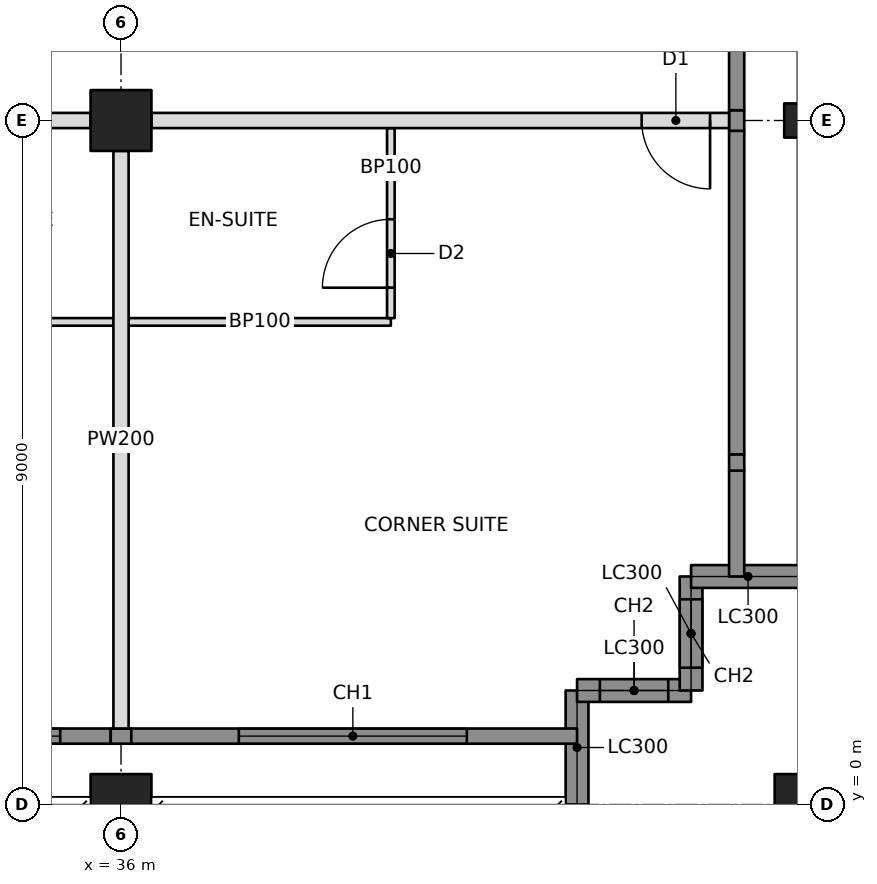
"""IFC4 building model, lengths in metres.
Left out: names, types, materials, properties, quantities, classifications, styles, units other than length and angle.
Written with IfcOpenShell. Run it as: python <this file> out.ifc"""

import sys

from ifc_helpers import new_model, si_unit, direction, frame, frame_2d, origin, origin_2d, place, context, subcontext, project, spatial, rectangle, hollow_rectangle, i_section, extrude, element, fill, save


model = new_model("IFC4")
c1 = context("Model", 3, precision=1e-05, world=origin(), true_north=direction((0.0, 1.0)))
c2 = subcontext(c1, "Body", "Model", "MODEL_VIEW")
j1 = project(units=[si_unit("LENGTHUNIT", "METRE"), si_unit("PLANEANGLEUNIT", "RADIAN")], contexts=[c1])
p1 = place(None, origin())
s1 = spatial("IfcSite", under=j1, at=p1, CompositionType="ELEMENT")
p2 = place(p1, origin())
s2 = spatial("IfcBuilding", under=s1, at=p2, CompositionType="ELEMENT")
p3 = place(p2, frame((0.0, 0.0, 184.2)))
s3 = spatial("IfcBuildingStorey", under=s2, at=p3, CompositionType="ELEMENT", Elevation=184.2)
p4 = place(p3, frame((36.0, 0.0, 0.0), z_axis=(0.0, 0.0, 1.0), x_axis=(1.0, 0.0, 0.0)))
e1 = element("IfcColumn", 1, at=p4, inside=s3, PredefinedType="COLUMN", context=c2, shape_type="SweptSolid", body=[
    extrude(hollow_rectangle(XDim=0.8, YDim=0.8, WallThickness=0.07, at=origin_2d()), origin(), (0.0, 0.0, 1.0), 3.4),
])
p5 = place(p3, frame((36.0, 9.0, 0.0), z_axis=(0.0, 0.0, 1.0), x_axis=(0.0, 1.0, 0.0)))
e2 = element("IfcColumn", 2, at=p5, inside=s3, PredefinedType="COLUMN", context=c2, shape_type="SweptSolid", body=[
    extrude(hollow_rectangle(XDim=0.8, YDim=0.8, WallThickness=0.06, at=origin_2d()), origin(), (0.0, 0.0, 1.0), 3.4),
])
p6 = place(p3, frame((45.0, 0.0, 0.0), z_axis=(0.0, 0.0, 1.0), x_axis=(1.0, 0.0, 0.0)))
e3 = element("IfcColumn", 3, at=p6, inside=s3, PredefinedType="COLUMN", context=c2, shape_type="SweptSolid", body=[
    extrude(hollow_rectangle(XDim=0.8, YDim=0.8, WallThickness=0.07, at=origin_2d()), origin(), (0.0, 0.0, 1.0), 3.4),
])
p7 = place(p3, frame((45.0, 9.0, 0.0), z_axis=(0.0, 0.0, 1.0), x_axis=(0.0, 1.0, 0.0)))
e4 = element("IfcColumn", 4, at=p7, inside=s3, PredefinedType="COLUMN", context=c2, shape_type="SweptSolid", body=[
    extrude(i_section(OverallWidth=0.449, OverallDepth=0.549, WebThickness=0.072, FlangeThickness=0.115, at=origin_2d()), origin(), (0.0, 0.0, 1.0), 3.4),
])
p8 = place(p3, frame((42.0, 0.0, 0.0), z_axis=(0.0, 0.0, 1.0), x_axis=(0.0, 1.0, 0.0)))
e5 = element("IfcWall", 5, at=p8, inside=s3, PredefinedType="SOLIDWALL", context=c2, shape_type="SweptSolid", body=[
    extrude(rectangle(XDim=1.5, YDim=0.3, at=frame_2d((0.75, 0.0))), origin(), (0.0, 0.0, 1.0), 2.42),
])
p9 = place(p3, frame((42.0, 1.5, 0.0), z_axis=(0.0, 0.0, 1.0), x_axis=(1.0, 0.0, 0.0)))
e6 = element("IfcWall", 6, at=p9, inside=s3, PredefinedType="SOLIDWALL", context=c2, shape_type="SweptSolid", body=[
    extrude(rectangle(XDim=1.5, YDim=0.3, at=frame_2d((0.75, 0.0))), origin(), (0.0, 0.0, 1.0), 3.2),
])
p10 = place(p9, frame((0.3, 0.0, 0.6)))
e7 = element("IfcOpeningElement", 7, at=p10, cuts=e6, PredefinedType="OPENING", context=c2, shape_type="SweptSolid", body=[
    extrude(rectangle(XDim=0.9, YDim=2.2, at=frame_2d((0.45, 1.1))), frame((0.0, 0.16, 0.0), z_axis=(0.0, -1.0, 0.0), x_axis=(1.0, 0.0, 0.0)), (0.0, 0.0, 1.0), 0.32),
])
p11 = place(p3, frame((43.5, 1.5, 0.0), z_axis=(0.0, 0.0, 1.0), x_axis=(0.0, 1.0, 0.0)))
e8 = element("IfcWall", 8, at=p11, inside=s3, PredefinedType="SOLIDWALL", context=c2, shape_type="SweptSolid", body=[
    extrude(rectangle(XDim=1.5, YDim=0.3, at=frame_2d((0.75, 0.0))), origin(), (0.0, 0.0, 1.0), 3.2),
])
p12 = place(p11, frame((0.3, 0.0, 0.6)))
e9 = element("IfcOpeningElement", 9, at=p12, cuts=e8, PredefinedType="OPENING", context=c2, shape_type="SweptSolid", body=[
    extrude(rectangle(XDim=0.9, YDim=2.2, at=frame_2d((0.45, 1.1))), frame((0.0, 0.16, 0.0), z_axis=(0.0, -1.0, 0.0), x_axis=(1.0, 0.0, 0.0)), (0.0, 0.0, 1.0), 0.32),
])
p13 = place(p3, frame((43.5, 3.0, 0.0), z_axis=(0.0, 0.0, 1.0), x_axis=(1.0, 0.0, 0.0)))
e10 = element("IfcWall", 10, at=p13, inside=s3, PredefinedType="SOLIDWALL", context=c2, shape_type="SweptSolid", body=[
    extrude(rectangle(XDim=1.5, YDim=0.3, at=frame_2d((0.75, 0.0))), origin(), (0.0, 0.0, 1.0), 2.42),
])
p14 = place(p3, frame((44.1, 3.0, 0.0), z_axis=(0.0, 0.0, 1.0), x_axis=(0.0, 1.0, 0.0)))
e11 = element("IfcWall", 11, at=p14, inside=s3, PredefinedType="SOLIDWALL", context=c2, shape_type="SweptSolid", body=[
    extrude(rectangle(XDim=1.393, YDim=0.2, at=frame_2d((0.696, 0.0))), origin(), (0.0, 0.0, 1.0), 3.2),
])
p15 = place(p3, frame((27.4, 9.0, 0.0), z_axis=(0.0, 0.0, 1.0), x_axis=(1.0, 0.0, 0.0)))
e12 = element("IfcWall", 12, at=p15, inside=s3, PredefinedType="PARTITIONING", context=c2, shape_type="SweptSolid", body=[
    extrude(rectangle(XDim=8.2, YDim=0.2, at=frame_2d((4.1, 0.0))), origin(), (0.0, 0.0, 1.0), 2.405),
])
p16 = place(p15, frame((0.15, 0.0, 0.0)))
e13 = element("IfcOpeningElement", 13, at=p16, cuts=e12, PredefinedType="OPENING", context=c2, shape_type="SweptSolid", body=[
    extrude(rectangle(XDim=0.9, YDim=2.1, at=frame_2d((0.45, 1.05))), frame((0.0, 0.11, 0.0), z_axis=(0.0, -1.0, 0.0), x_axis=(1.0, 0.0, 0.0)), (0.0, 0.0, 1.0), 0.22),
])
p17 = place(p3, frame((36.4, 9.0, 0.0), z_axis=(0.0, 0.0, 1.0), x_axis=(1.0, 0.0, 0.0)))
e14 = element("IfcWall", 14, at=p17, inside=s3, PredefinedType="PARTITIONING", context=c2, shape_type="SweptSolid", body=[
    extrude(rectangle(XDim=7.6, YDim=0.2, at=frame_2d((3.8, 0.0))), origin(), (0.0, 0.0, 1.0), 2.438),
])
p18 = place(p17, frame((6.45, 0.0, 0.0)))
e15 = element("IfcOpeningElement", 15, at=p18, cuts=e14, PredefinedType="OPENING", context=c2, shape_type="SweptSolid", body=[
    extrude(rectangle(XDim=0.9, YDim=2.1, at=frame_2d((0.45, 1.05))), frame((0.0, 0.11, 0.0), z_axis=(0.0, -1.0, 0.0), x_axis=(1.0, 0.0, 0.0)), (0.0, 0.0, 1.0), 0.22),
])
p19 = place(p3, frame((36.0, 8.6, 0.0), z_axis=(0.0, 0.0, 1.0), x_axis=(0.0, -1.0, 0.0)))
e16 = element("IfcWall", 16, at=p19, inside=s3, PredefinedType="PARTITIONING", context=c2, shape_type="SweptSolid", body=[
    extrude(rectangle(XDim=7.6, YDim=0.2, at=frame_2d((3.8, 0.0))), origin(), (0.0, 0.0, 1.0), 2.438),
])
for number, where, z_axis, x_axis in (
    (17, (32.45, 6.35, 0.0), (0.0, 0.0, 1.0), (1.0, 0.0, 0.0)),
    (18, (36.1, 6.35, 0.0), (0.0, 0.0, 1.0), (1.0, 0.0, 0.0)),
):
    element("IfcWall", number, at=place(p3, frame(where, z_axis=z_axis, x_axis=x_axis)), inside=s3, PredefinedType="PARTITIONING", context=c2, shape_type="SweptSolid", body=[
        extrude(rectangle(XDim=3.45, YDim=0.1, at=frame_2d((1.725, 0.0))), origin(), (0.0, 0.0, 1.0), 2.438),
    ])
p20 = place(p3, frame((39.55, 8.9, 0.0), z_axis=(0.0, 0.0, 1.0), x_axis=(0.0, -1.0, 0.0)))
e19 = element("IfcWall", 19, at=p20, inside=s3, PredefinedType="PARTITIONING", context=c2, shape_type="SweptSolid", body=[
    extrude(rectangle(XDim=2.5, YDim=0.1, at=frame_2d((1.25, 0.0))), origin(), (0.0, 0.0, 1.0), 2.438),
])
p21 = place(p20, frame((1.2, 0.0, 0.0)))
e20 = element("IfcOpeningElement", 20, at=p21, cuts=e19, PredefinedType="OPENING", context=c2, shape_type="SweptSolid", body=[
    extrude(rectangle(XDim=0.9, YDim=2.1, at=frame_2d((0.45, 1.05))), frame((0.0, 0.06, 0.0), z_axis=(0.0, -1.0, 0.0), x_axis=(1.0, 0.0, 0.0)), (0.0, 0.0, 1.0), 0.12),
])
p22 = place(p3, frame((27.194, 0.9, 0.0), z_axis=(0.0, 0.0, 1.0), x_axis=(1.0, 0.0, 0.0)))
e21 = element("IfcWall", 21, at=p22, inside=s3, PredefinedType="SOLIDWALL", context=c2, shape_type="SweptSolid", body=[
    extrude(rectangle(XDim=8.671, YDim=0.2, at=frame_2d((4.335, 0.0))), origin(), (0.0, 0.0, 1.0), 3.2),
])
p23 = place(p22, frame((0.606, 0.0, 0.6)))
e22 = element("IfcOpeningElement", 22, at=p23, cuts=e21, PredefinedType="OPENING", context=c2, shape_type="SweptSolid", body=[
    extrude(rectangle(XDim=3.0, YDim=2.2, at=frame_2d((1.5, 1.1))), frame((0.0, 0.11, 0.0), z_axis=(0.0, -1.0, 0.0), x_axis=(1.0, 0.0, 0.0)), (0.0, 0.0, 1.0), 0.22),
])
p24 = place(p22, frame((5.006, 0.0, 0.6)))
e23 = element("IfcOpeningElement", 23, at=p24, cuts=e21, PredefinedType="OPENING", context=c2, shape_type="SweptSolid", body=[
    extrude(rectangle(XDim=3.0, YDim=2.2, at=frame_2d((1.5, 1.1))), frame((0.0, 0.11, 0.0), z_axis=(0.0, -1.0, 0.0), x_axis=(1.0, 0.0, 0.0)), (0.0, 0.0, 1.0), 0.22),
])
p25 = place(p3, frame((35.865, 0.9, 0.0), z_axis=(0.0, 0.0, 1.0), x_axis=(1.0, 0.0, 0.0)))
e24 = element("IfcWall", 24, at=p25, inside=s3, PredefinedType="SOLIDWALL", context=c2, shape_type="SweptSolid", body=[
    extrude(rectangle(XDim=0.271, YDim=0.2, at=frame_2d((0.135, 0.0))), origin(), (0.0, 0.0, 1.0), 2.438),
])
p26 = place(p3, frame((36.135, 0.9, 0.0), z_axis=(0.0, 0.0, 1.0), x_axis=(1.0, 0.0, 0.0)))
e25 = element("IfcWall", 25, at=p26, inside=s3, PredefinedType="SOLIDWALL", context=c2, shape_type="SweptSolid", body=[
    extrude(rectangle(XDim=5.865, YDim=0.2, at=frame_2d((2.932, 0.0))), origin(), (0.0, 0.0, 1.0), 3.2),
])
p27 = place(p26, frame((1.415, 0.0, 0.6)))
e26 = element("IfcOpeningElement", 26, at=p27, cuts=e25, PredefinedType="OPENING", context=c2, shape_type="SweptSolid", body=[
    extrude(rectangle(XDim=3.0, YDim=2.2, at=frame_2d((1.5, 1.1))), frame((0.0, 0.11, 0.0), z_axis=(0.0, -1.0, 0.0), x_axis=(1.0, 0.0, 0.0)), (0.0, 0.0, 1.0), 0.22),
])
p28 = place(p3, frame((44.1, 4.393, 0.0), z_axis=(0.0, 0.0, 1.0), x_axis=(0.0, 1.0, 0.0)))
e27 = element("IfcWall", 27, at=p28, inside=s3, PredefinedType="SOLIDWALL", context=c2, shape_type="SweptSolid", body=[
    extrude(rectangle(XDim=0.215, YDim=0.2, at=frame_2d((0.107, 0.0))), origin(), (0.0, 0.0, 1.0), 2.661),
])
p29 = place(p3, frame((44.1, 4.607, 0.0), z_axis=(0.0, 0.0, 1.0), x_axis=(0.0, 1.0, 0.0)))
e28 = element("IfcWall", 28, at=p29, inside=s3, PredefinedType="SOLIDWALL", context=c2, shape_type="SweptSolid", body=[
    extrude(rectangle(XDim=4.257, YDim=0.2, at=frame_2d((2.129, 0.0))), origin(), (0.0, 0.0, 1.0), 3.2),
])
p30 = place(p3, frame((44.1, 8.865, 0.0), z_axis=(0.0, 0.0, 1.0), x_axis=(0.0, 1.0, 0.0)))
e29 = element("IfcWall", 29, at=p30, inside=s3, PredefinedType="SOLIDWALL", context=c2, shape_type="SweptSolid", body=[
    extrude(rectangle(XDim=0.271, YDim=0.2, at=frame_2d((0.135, 0.0))), origin(), (0.0, 0.0, 1.0), 2.438),
])
p31 = place(p3, frame((44.1, 9.135, 0.0), z_axis=(0.0, 0.0, 1.0), x_axis=(0.0, 1.0, 0.0)))
e30 = element("IfcWall", 30, at=p31, inside=s3, PredefinedType="SOLIDWALL", context=c2, shape_type="SweptSolid", body=[
    extrude(rectangle(XDim=8.671, YDim=0.2, at=frame_2d((4.335, 0.0))), origin(), (0.0, 0.0, 1.0), 3.2),
])
p32 = place(p31, frame((2.015, 0.0, 0.6)))
e31 = element("IfcOpeningElement", 31, at=p32, cuts=e30, PredefinedType="OPENING", context=c2, shape_type="SweptSolid", body=[
    extrude(rectangle(XDim=3.0, YDim=2.2, at=frame_2d((1.5, 1.1))), frame((0.0, 0.11, 0.0), z_axis=(0.0, -1.0, 0.0), x_axis=(1.0, 0.0, 0.0)), (0.0, 0.0, 1.0), 0.22),
])
p33 = place(p31, frame((5.515, 0.0, 0.6)))
e32 = element("IfcOpeningElement", 32, at=p33, cuts=e30, PredefinedType="OPENING", context=c2, shape_type="SweptSolid", body=[
    extrude(rectangle(XDim=3.0, YDim=2.2, at=frame_2d((1.5, 1.1))), frame((0.0, 0.11, 0.0), z_axis=(0.0, -1.0, 0.0), x_axis=(1.0, 0.0, 0.0)), (0.0, 0.0, 1.0), 0.22),
])
p34 = place(p10, origin())
e33 = element("IfcWindow", 33, at=p34, inside=s3, PartitioningType="SINGLE_PANEL", PredefinedType="WINDOW", context=c2, shape_type="SweptSolid", body=[
    extrude(rectangle(XDim=0.9, YDim=2.2, at=frame_2d((0.45, 1.1))), frame((0.0, 0.03, 0.0), z_axis=(0.0, -1.0, 0.0), x_axis=(1.0, 0.0, 0.0)), (0.0, 0.0, 1.0), 0.06),
])
fill(e7, e33)
p35 = place(p12, origin())
e34 = element("IfcWindow", 34, at=p35, inside=s3, PartitioningType="SINGLE_PANEL", PredefinedType="WINDOW", context=c2, shape_type="SweptSolid", body=[
    extrude(rectangle(XDim=0.9, YDim=2.2, at=frame_2d((0.45, 1.1))), frame((0.0, 0.03, 0.0), z_axis=(0.0, -1.0, 0.0), x_axis=(1.0, 0.0, 0.0)), (0.0, 0.0, 1.0), 0.06),
])
fill(e9, e34)
p36 = place(p24, origin())
e35 = element("IfcWindow", 35, at=p36, inside=s3, PartitioningType="TRIPLE_PANEL_VERTICAL", PredefinedType="WINDOW", context=c2, shape_type="SweptSolid", body=[
    extrude(rectangle(XDim=3.0, YDim=2.2, at=frame_2d((1.5, 1.1))), frame((0.0, 0.03, 0.0), z_axis=(0.0, -1.0, 0.0), x_axis=(1.0, 0.0, 0.0)), (0.0, 0.0, 1.0), 0.06),
])
fill(e23, e35)
p37 = place(p27, origin())
e36 = element("IfcWindow", 36, at=p37, inside=s3, PartitioningType="TRIPLE_PANEL_VERTICAL", PredefinedType="WINDOW", context=c2, shape_type="SweptSolid", body=[
    extrude(rectangle(XDim=3.0, YDim=2.2, at=frame_2d((1.5, 1.1))), frame((0.0, 0.03, 0.0), z_axis=(0.0, -1.0, 0.0), x_axis=(1.0, 0.0, 0.0)), (0.0, 0.0, 1.0), 0.06),
])
fill(e26, e36)
p38 = place(p21, frame((0.9, 0.0, 0.0), z_axis=(0.0, 0.0, 1.0), x_axis=(-1.0, 0.0, 0.0)))
e37 = element("IfcDoor", 37, at=p38, inside=s3, OperationType="SINGLE_SWING_LEFT", PredefinedType="DOOR", context=c2, shape_type="SweptSolid", body=[
    extrude(rectangle(XDim=0.9, YDim=2.1, at=frame_2d((0.45, 1.05))), frame((0.0, 0.025, 0.0), z_axis=(0.0, -1.0, 0.0), x_axis=(1.0, 0.0, 0.0)), (0.0, 0.0, 1.0), 0.05),
])
fill(e20, e37)
p39 = place(p18, frame((0.9, 0.0, 0.0), z_axis=(0.0, 0.0, 1.0), x_axis=(-1.0, 0.0, 0.0)))
e38 = element("IfcDoor", 38, at=p39, inside=s3, OperationType="SINGLE_SWING_LEFT", PredefinedType="DOOR", context=c2, shape_type="SweptSolid", body=[
    extrude(rectangle(XDim=0.9, YDim=2.1, at=frame_2d((0.45, 1.05))), frame((0.0, 0.025, 0.0), z_axis=(0.0, -1.0, 0.0), x_axis=(1.0, 0.0, 0.0)), (0.0, 0.0, 1.0), 0.05),
])
fill(e15, e38)
save(model, sys.argv[1])
